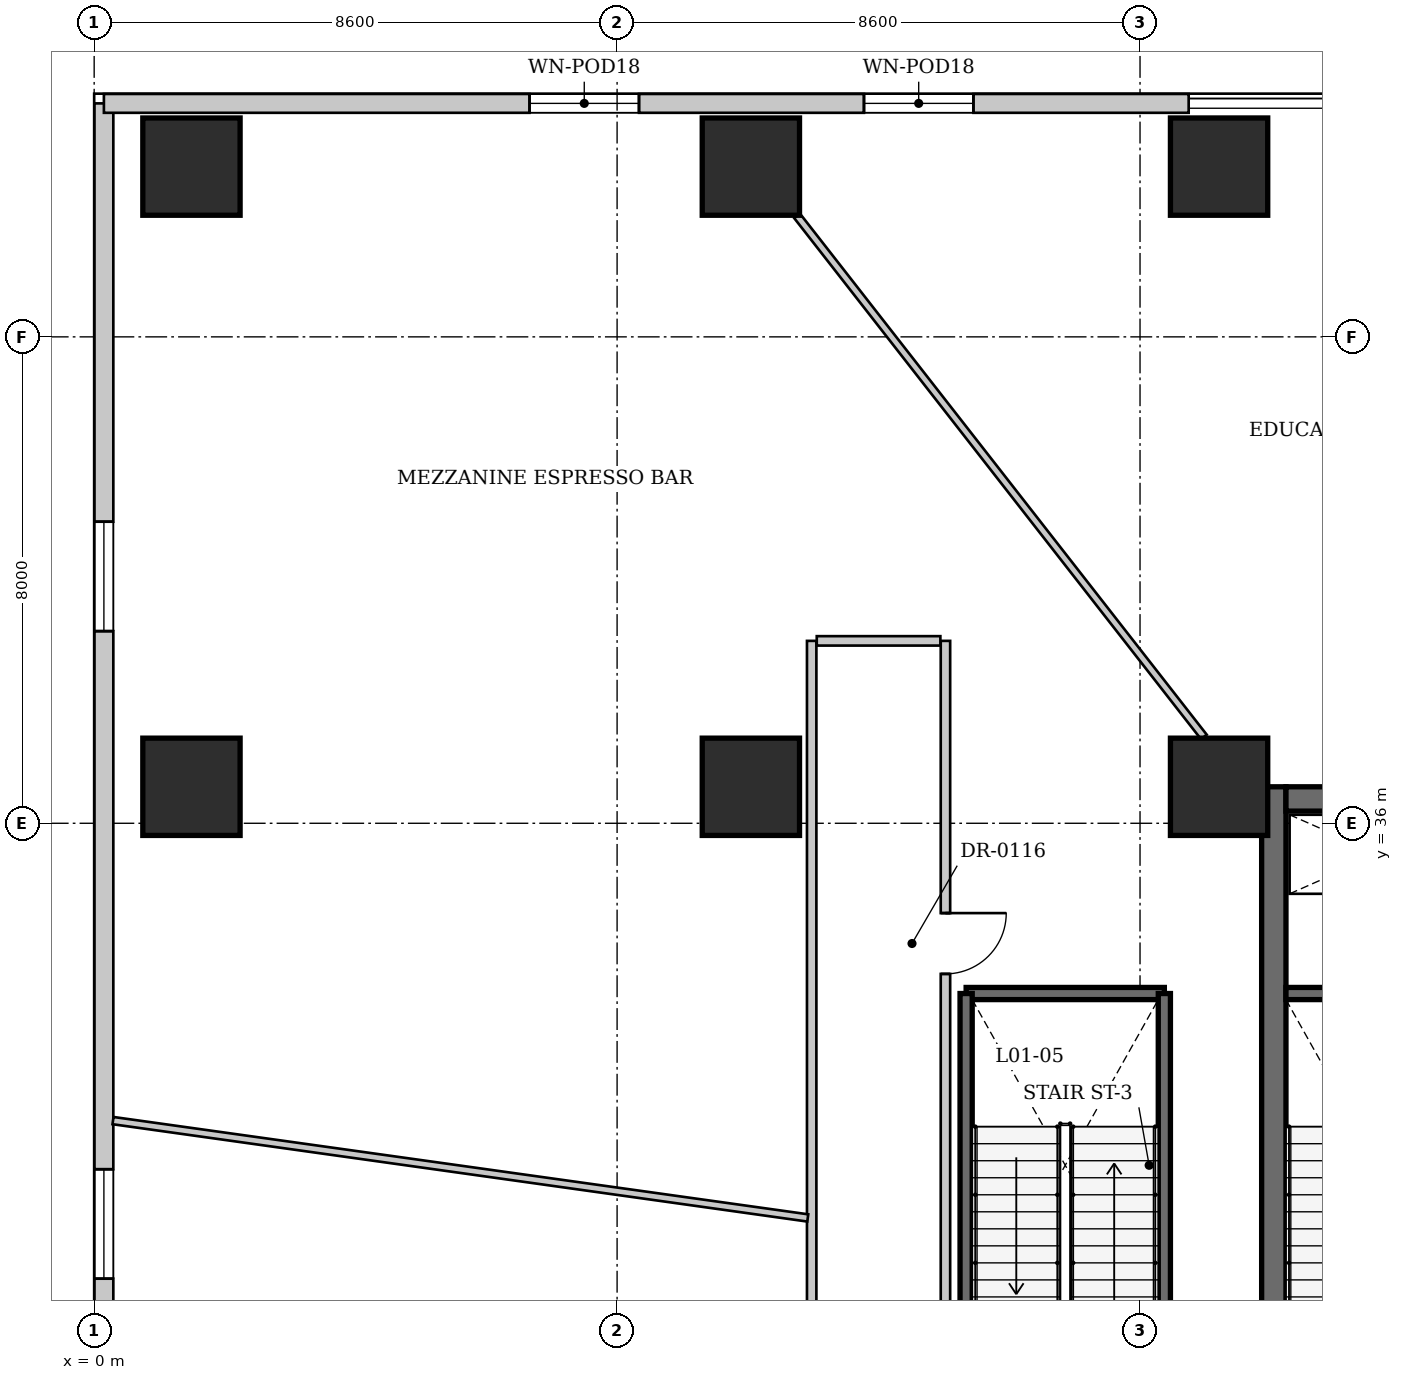
"""IFC4 building model, lengths in metres.
Left out: names, types, materials, properties, quantities, classifications, styles, units other than length and angle.
Written with IfcOpenShell. Run it as: python <this file> out.ifc"""

import sys

from ifc_helpers import new_model, si_unit, direction, frame, frame_2d, origin, origin_2d, place, context, subcontext, project, spatial, rectangle, extrude, source, transform, mapped, element, fill, save


model = new_model("IFC4")
c1 = context("Model", 3, precision=1e-05, world=origin(), true_north=direction((0.0, 1.0)))
c2 = subcontext(c1, "Body", "Model", "MODEL_VIEW")
j1 = project(units=[si_unit("LENGTHUNIT", "METRE"), si_unit("PLANEANGLEUNIT", "RADIAN")], contexts=[c1])
p1 = place(None, origin())
s1 = spatial("IfcSite", under=j1, at=p1, CompositionType="ELEMENT")
p2 = place(p1, origin())
s2 = spatial("IfcBuilding", under=s1, at=p2, CompositionType="ELEMENT")
p3 = place(p2, frame((0.0, 0.0, 5.2)))
s3 = spatial("IfcBuildingStorey", under=s2, at=p3, CompositionType="ELEMENT", Elevation=5.2)
for number, where, z_axis, x_axis in (
    (1, (1.6, 36.6, 0.0), (0.0, 0.0, 1.0), (1.0, 0.0, 0.0)),
    (2, (1.6, 46.8, 0.0), (0.0, 0.0, 1.0), (1.0, 0.0, 0.0)),
    (3, (10.8, 46.8, 0.0), (0.0, 0.0, 1.0), (1.0, 0.0, 0.0)),
    (4, (18.5, 46.8, 0.0), (0.0, 0.0, 1.0), (1.0, 0.0, 0.0)),
    (5, (10.8, 36.6, 0.0), (0.0, 0.0, 1.0), (1.0, 0.0, 0.0)),
    (6, (18.5, 36.6, 0.0), (0.0, 0.0, 1.0), (1.0, 0.0, 0.0)),
):
    element("IfcColumn", number, at=place(p3, frame(where, z_axis=z_axis, x_axis=x_axis)), inside=s3, PredefinedType="COLUMN", context=c2, shape_type="SweptSolid", body=[
        extrude(rectangle(XDim=1.6, YDim=1.6, at=origin_2d()), origin(), (0.0, 0.0, 1.0), 4.3),
    ])
p4 = place(p3, frame((0.16, 8.16, 0.0), z_axis=(0.0, 0.0, 1.0), x_axis=(0.0, 1.0, 0.0)))
e7 = element("IfcWall", 7, at=p4, inside=s3, PredefinedType="SOLIDWALL", context=c2, shape_type="SweptSolid", body=[
    extrude(rectangle(XDim=39.68, YDim=0.31, at=frame_2d((19.84, 0.0))), origin(), (0.0, 0.0, 1.0), 4.05),
])
p5 = place(p4, frame((4.45, 0.0, 0.95)))
e8 = element("IfcOpeningElement", 8, at=p5, cuts=e7, PredefinedType="OPENING", context=c2, shape_type="SweptSolid", body=[
    extrude(rectangle(XDim=1.8, YDim=2.4, at=frame_2d((0.9, 1.2))), frame((0.0, 0.165, 0.0), z_axis=(0.0, -1.0, 0.0), x_axis=(1.0, 0.0, 0.0)), (0.0, 0.0, 1.0), 0.33),
])
p6 = place(p4, frame((13.0, 0.0, 0.95)))
e9 = element("IfcOpeningElement", 9, at=p6, cuts=e7, PredefinedType="OPENING", context=c2, shape_type="SweptSolid", body=[
    extrude(rectangle(XDim=1.8, YDim=2.4, at=frame_2d((0.9, 1.2))), frame((0.0, 0.165, 0.0), z_axis=(0.0, -1.0, 0.0), x_axis=(1.0, 0.0, 0.0)), (0.0, 0.0, 1.0), 0.33),
])
p7 = place(p4, frame((20.35, 0.0, 0.95)))
e10 = element("IfcOpeningElement", 10, at=p7, cuts=e7, PredefinedType="OPENING", context=c2, shape_type="SweptSolid", body=[
    extrude(rectangle(XDim=1.8, YDim=2.4, at=frame_2d((0.9, 1.2))), frame((0.0, 0.165, 0.0), z_axis=(0.0, -1.0, 0.0), x_axis=(1.0, 0.0, 0.0)), (0.0, 0.0, 1.0), 0.33),
])
p8 = place(p4, frame((31.0, 0.0, 0.95)))
e11 = element("IfcOpeningElement", 11, at=p8, cuts=e7, PredefinedType="OPENING", context=c2, shape_type="SweptSolid", body=[
    extrude(rectangle(XDim=1.8, YDim=2.4, at=frame_2d((0.9, 1.2))), frame((0.0, 0.165, 0.0), z_axis=(0.0, -1.0, 0.0), x_axis=(1.0, 0.0, 0.0)), (0.0, 0.0, 1.0), 0.33),
])
p9 = place(p3, frame((0.16, 47.84, 0.0), z_axis=(0.0, 0.0, 1.0), x_axis=(1.0, 0.0, 0.0)))
e12 = element("IfcWall", 12, at=p9, inside=s3, PredefinedType="SOLIDWALL", context=c2, shape_type="SweptSolid", body=[
    extrude(rectangle(XDim=17.84, YDim=0.31, at=frame_2d((8.92, 0.0))), origin(), (0.0, 0.0, 1.0), 4.05),
])
p10 = place(p9, frame((7.0, 0.0, 0.95)))
e13 = element("IfcOpeningElement", 13, at=p10, cuts=e12, PredefinedType="OPENING", context=c2, shape_type="SweptSolid", body=[
    extrude(rectangle(XDim=1.8, YDim=2.4, at=frame_2d((0.9, 1.2))), frame((0.0, 0.165, 0.0), z_axis=(0.0, -1.0, 0.0), x_axis=(1.0, 0.0, 0.0)), (0.0, 0.0, 1.0), 0.33),
])
p11 = place(p9, frame((12.5, 0.0, 0.95)))
e14 = element("IfcOpeningElement", 14, at=p11, cuts=e12, PredefinedType="OPENING", context=c2, shape_type="SweptSolid", body=[
    extrude(rectangle(XDim=1.8, YDim=2.4, at=frame_2d((0.9, 1.2))), frame((0.0, 0.165, 0.0), z_axis=(0.0, -1.0, 0.0), x_axis=(1.0, 0.0, 0.0)), (0.0, 0.0, 1.0), 0.33),
])
p12 = place(p3, frame((19.4, 25.8, 0.0), z_axis=(0.0, 0.0, 1.0), x_axis=(0.0, 1.0, 0.0)))
e15 = element("IfcWall", 15, at=p12, inside=s3, PredefinedType="SHEAR", context=c2, shape_type="SweptSolid", body=[
    extrude(rectangle(XDim=10.8, YDim=0.4, at=frame_2d((5.4, 0.0))), origin(), (0.0, 0.0, 1.0), 4.6),
])
p13 = place(p3, frame((19.6, 36.4, 0.0), z_axis=(0.0, 0.0, 1.0), x_axis=(1.0, 0.0, 0.0)))
e16 = element("IfcWall", 16, at=p13, inside=s3, PredefinedType="SHEAR", context=c2, shape_type="SweptSolid", body=[
    extrude(rectangle(XDim=12.8, YDim=0.4, at=frame_2d((6.4, 0.0))), origin(), (0.0, 0.0, 1.0), 4.6),
])
p14 = place(p3, frame((19.6, 33.2, 0.0), z_axis=(0.0, 0.0, 1.0), x_axis=(1.0, 0.0, 0.0)))
e17 = element("IfcWall", 17, at=p14, inside=s3, PredefinedType="SHEAR", context=c2, shape_type="SweptSolid", body=[
    extrude(rectangle(XDim=3.06, YDim=0.2, at=frame_2d((1.53, 0.0))), origin(), (0.0, 0.0, 1.0), 4.6),
])
p15 = place(p3, frame((14.34, 33.2, 0.0), z_axis=(0.0, 0.0, 1.0), x_axis=(1.0, 0.0, 0.0)))
e18 = element("IfcWall", 18, at=p15, inside=s3, PredefinedType="SHEAR", context=c2, shape_type="SweptSolid", body=[
    extrude(rectangle(XDim=3.26, YDim=0.2, at=frame_2d((1.63, 0.0))), origin(), (0.0, 0.0, 1.0), 4.6),
])
for number, where, z_axis, x_axis in (
    (19, (14.34, 26.1, 0.0), (0.0, 0.0, 1.0), (0.0, 1.0, 0.0)),
    (20, (17.6, 26.1, 0.0), (0.0, 0.0, 1.0), (0.0, 1.0, 0.0)),
):
    element("IfcWall", number, at=place(p3, frame(where, z_axis=z_axis, x_axis=x_axis)), inside=s3, PredefinedType="SHEAR", context=c2, shape_type="SweptSolid", body=[
        extrude(rectangle(XDim=7.1, YDim=0.2, at=frame_2d((3.55, 0.0))), origin(), (0.0, 0.0, 1.0), 4.6),
    ])
p16 = place(p3, frame((14.0, 39.0, 0.0), z_axis=(0.0, 0.0, 1.0), x_axis=(0.0, -1.0, 0.0)))
e21 = element("IfcWall", 21, at=p16, inside=s3, PredefinedType="PARTITIONING", context=c2, shape_type="SweptSolid", body=[
    extrude(rectangle(XDim=12.88, YDim=0.155, at=frame_2d((6.44, 0.0))), origin(), (0.0, 0.0, 1.0), 4.3),
])
p17 = place(p16, frame((4.477, 0.0, 0.0)))
e22 = element("IfcOpeningElement", 22, at=p17, cuts=e21, PredefinedType="OPENING", context=c2, shape_type="SweptSolid", body=[
    extrude(rectangle(XDim=1.0, YDim=2.15, at=frame_2d((0.5, 1.075))), frame((0.0, 0.087, 0.0), z_axis=(0.0, -1.0, 0.0), x_axis=(1.0, 0.0, 0.0)), (0.0, 0.0, 1.0), 0.175),
])
p18 = place(p3, frame((11.8, 26.12, 0.0), z_axis=(0.0, 0.0, 1.0), x_axis=(0.0, 1.0, 0.0)))
e23 = element("IfcWall", 23, at=p18, inside=s3, PredefinedType="PARTITIONING", context=c2, shape_type="SweptSolid", body=[
    extrude(rectangle(XDim=12.88, YDim=0.155, at=frame_2d((6.44, 0.0))), origin(), (0.0, 0.0, 1.0), 4.3),
])
p19 = place(p3, frame((11.884, 39.0, 0.0), z_axis=(0.0, 0.0, 1.0), x_axis=(1.0, 0.0, 0.0)))
e24 = element("IfcWall", 24, at=p19, inside=s3, PredefinedType="PARTITIONING", context=c2, shape_type="SweptSolid", body=[
    extrude(rectangle(XDim=2.033, YDim=0.155, at=frame_2d((1.017, 0.0))), origin(), (0.0, 0.0, 1.0), 4.3),
])
p20 = place(p3, frame((0.31, 31.11, 0.0), z_axis=(0.0, 0.0, 1.0), x_axis=(0.990323897966, -0.138775275601, 0.0)))
e25 = element("IfcWall", 25, at=p20, inside=s3, PredefinedType="PARTITIONING", context=c2, shape_type="SweptSolid", body=[
    extrude(rectangle(XDim=11.537, YDim=0.12, at=frame_2d((5.769, 0.0))), origin(), (0.0, 0.0, 1.0), 4.3),
])
p21 = place(p3, frame((18.25, 37.42, 0.0), z_axis=(0.0, 0.0, 1.0), x_axis=(-0.615334161376, 0.788266369855, 0.0)))
e26 = element("IfcWall", 26, at=p21, inside=s3, PredefinedType="PARTITIONING", context=c2, shape_type="SweptSolid", body=[
    extrude(rectangle(XDim=10.872, YDim=0.12, at=frame_2d((5.436, 0.0))), origin(), (0.0, 0.0, 1.0), 4.3),
])
m1 = source(origin(), c2, "Body", "SweptSolid", [
    extrude(rectangle(XDim=1.8, YDim=2.4, at=frame_2d((0.9, 1.2))), frame((0.0, 0.03, 0.0), z_axis=(0.0, -1.0, 0.0), x_axis=(1.0, 0.0, 0.0)), (0.0, 0.0, 1.0), 0.06),
])
p22 = place(p10, origin())
e27 = element("IfcWindow", 27, at=p22, inside=s3, PartitioningType="SINGLE_PANEL", PredefinedType="WINDOW", context=c2, shape_type="MappedRepresentation", body=[
    mapped(m1, transform((0.0, 0.0, 0.0), x_axis=(1.0, 0.0, 0.0), y_axis=(0.0, 1.0, 0.0), z_axis=(0.0, 0.0, 1.0), scale=1.0)),
])
fill(e13, e27)
p23 = place(p11, origin())
e28 = element("IfcWindow", 28, at=p23, inside=s3, PartitioningType="SINGLE_PANEL", PredefinedType="WINDOW", context=c2, shape_type="MappedRepresentation", body=[
    mapped(m1, transform((0.0, 0.0, 0.0), x_axis=(1.0, 0.0, 0.0), y_axis=(0.0, 1.0, 0.0), z_axis=(0.0, 0.0, 1.0), scale=1.0)),
])
fill(e14, e28)
p24 = place(p7, origin())
e29 = element("IfcWindow", 29, at=p24, inside=s3, PartitioningType="SINGLE_PANEL", PredefinedType="WINDOW", context=c2, shape_type="MappedRepresentation", body=[
    mapped(m1, transform((0.0, 0.0, 0.0), x_axis=(1.0, 0.0, 0.0), y_axis=(0.0, 1.0, 0.0), z_axis=(0.0, 0.0, 1.0), scale=1.0)),
])
fill(e10, e29)
p25 = place(p8, origin())
e30 = element("IfcWindow", 30, at=p25, inside=s3, PartitioningType="SINGLE_PANEL", PredefinedType="WINDOW", context=c2, shape_type="MappedRepresentation", body=[
    mapped(m1, transform((0.0, 0.0, 0.0), x_axis=(1.0, 0.0, 0.0), y_axis=(0.0, 1.0, 0.0), z_axis=(0.0, 0.0, 1.0), scale=1.0)),
])
fill(e11, e30)
m2 = source(origin(), c2, "Body", "SweptSolid", [
    extrude(rectangle(XDim=1.0, YDim=2.15, at=frame_2d((0.5, 1.075))), frame((0.0, 0.025, 0.0), z_axis=(0.0, -1.0, 0.0), x_axis=(1.0, 0.0, 0.0)), (0.0, 0.0, 1.0), 0.05),
])
p26 = place(p17, origin())
e31 = element("IfcDoor", 31, at=p26, inside=s3, OperationType="SINGLE_SWING_LEFT", PredefinedType="DOOR", context=c2, shape_type="MappedRepresentation", body=[
    mapped(m2, transform((0.0, 0.0, 0.0), x_axis=(1.0, 0.0, 0.0), y_axis=(0.0, 1.0, 0.0), z_axis=(0.0, 0.0, 1.0), scale=1.0)),
])
fill(e22, e31)
save(model, sys.argv[1])
